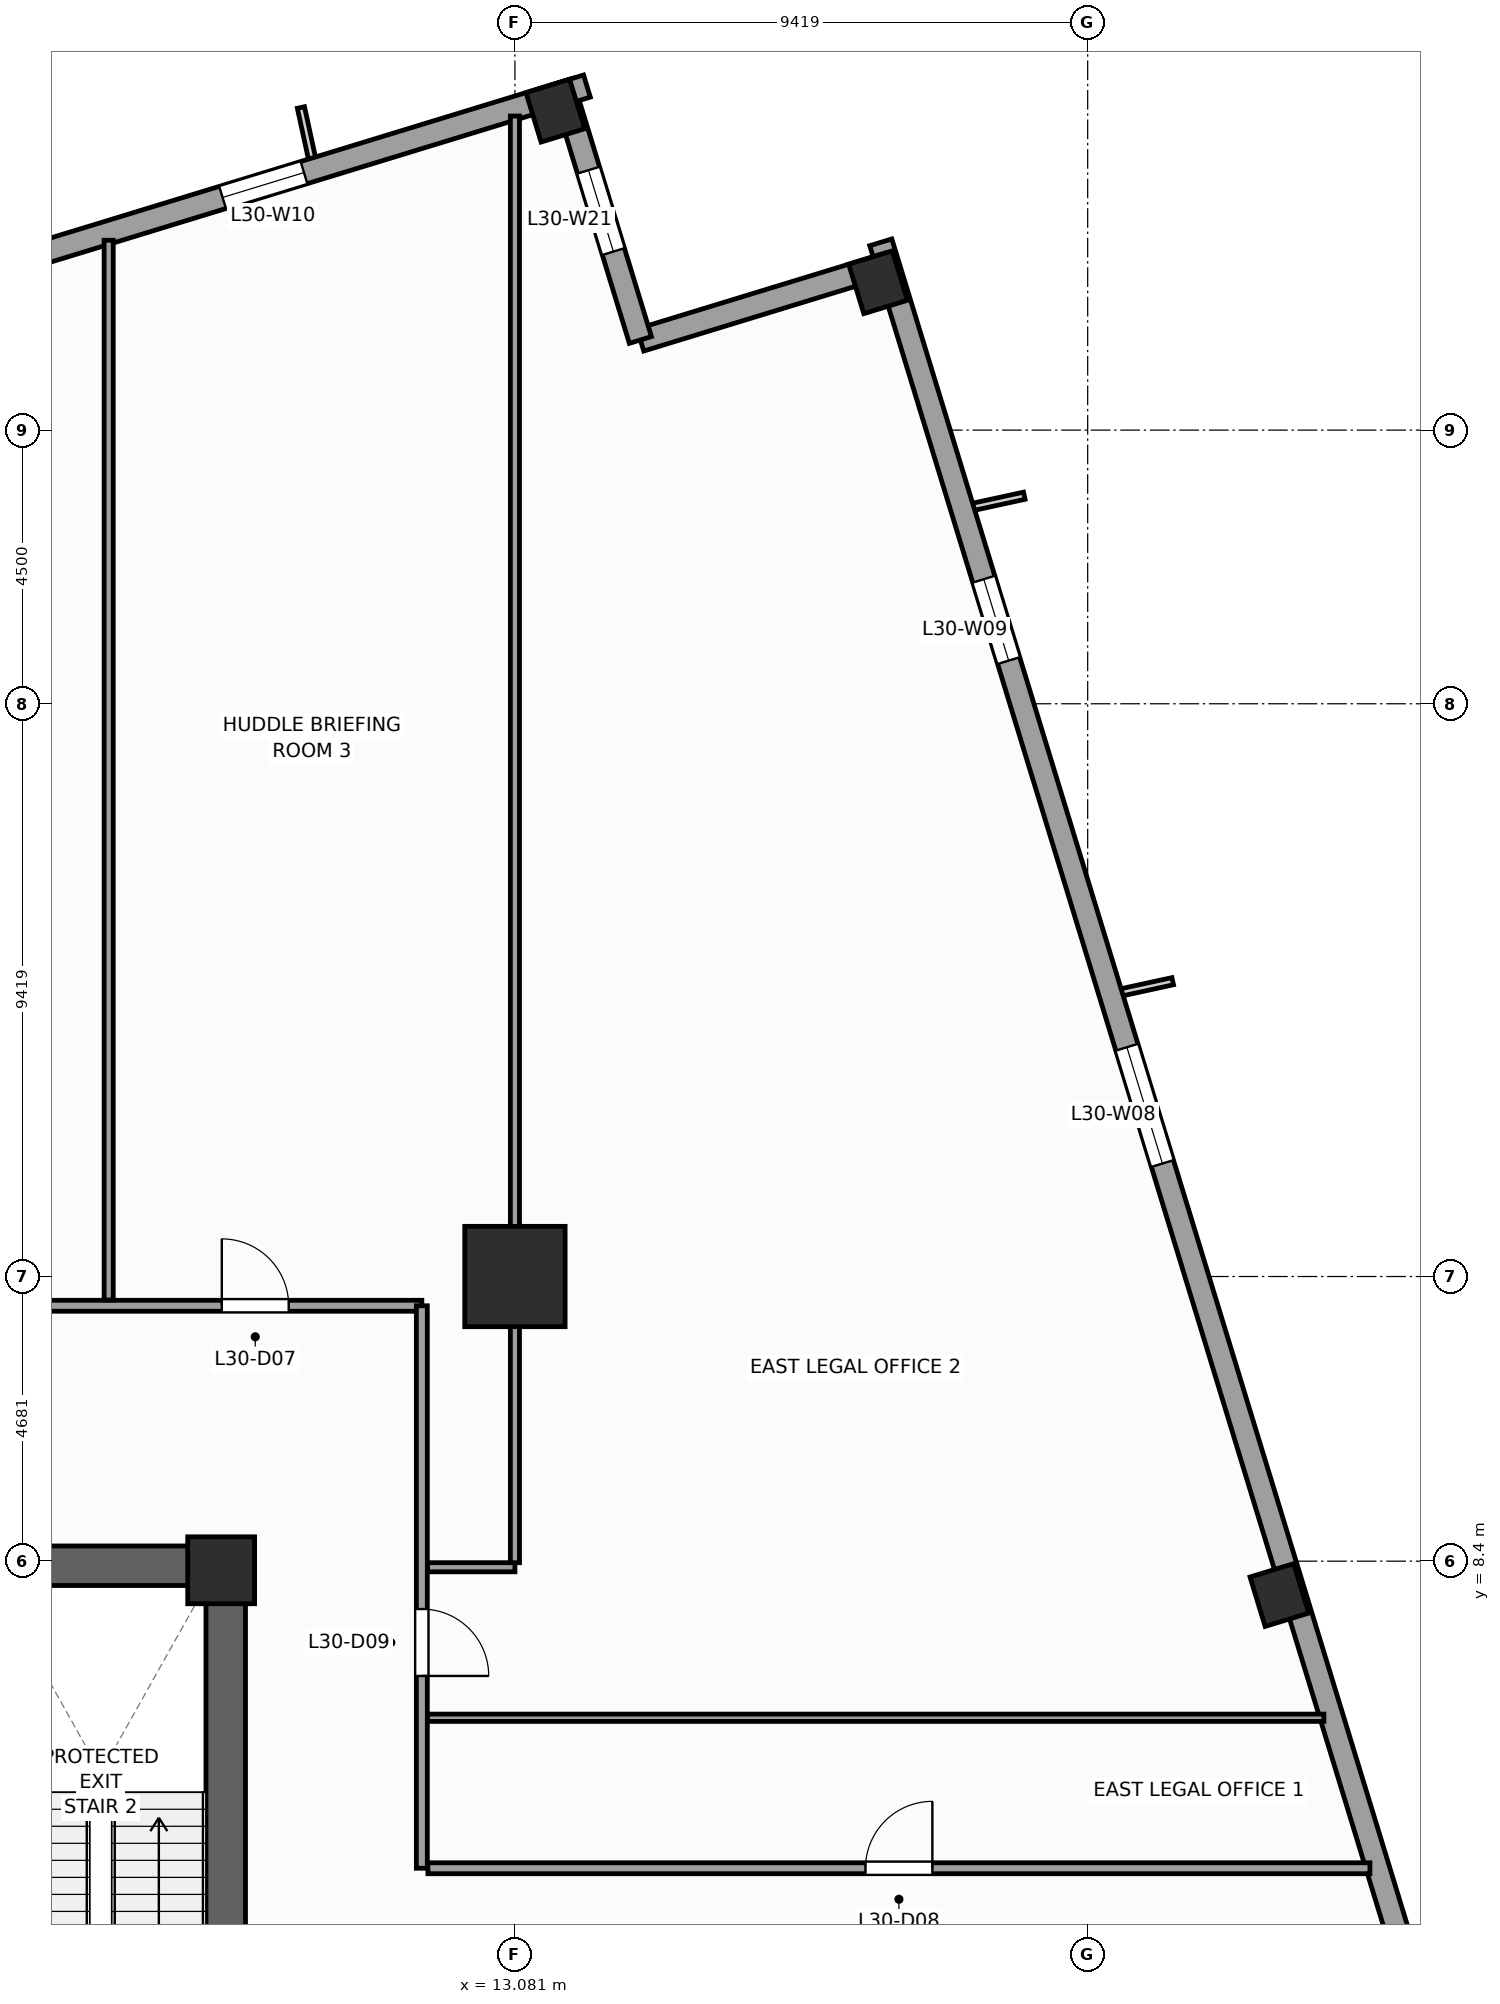
"""IFC4 building model, lengths in metres.
Left out: names, types, materials, properties, quantities, classifications, styles, units other than length and angle.
Written with IfcOpenShell. Run it as: python <this file> out.ifc"""

import sys

from ifc_helpers import new_model, si_unit, direction, frame, frame_2d, origin, origin_2d, place, context, subcontext, project, spatial, rectangle, extrude, source, transform, mapped, element, fill, save


model = new_model("IFC4")
c1 = context("Model", 3, precision=1e-05, world=origin(), true_north=direction((0.0, 1.0)))
c2 = subcontext(c1, "Body", "Model", "MODEL_VIEW")
j1 = project(units=[si_unit("LENGTHUNIT", "METRE"), si_unit("PLANEANGLEUNIT", "RADIAN")], contexts=[c1])
p1 = place(None, origin())
s1 = spatial("IfcSite", under=j1, at=p1, CompositionType="ELEMENT")
p2 = place(p1, origin())
s2 = spatial("IfcBuilding", under=s1, at=p2, CompositionType="ELEMENT")
p3 = place(p2, frame((0.0, 0.0, 127.2)))
s3 = spatial("IfcBuildingStorey", under=s2, at=p3, CompositionType="ELEMENT", Elevation=127.2)
p4 = place(p3, frame((-8.65, 8.325, 0.0), z_axis=(0.0, 0.0, 1.0), x_axis=(1.0, 0.0, 0.0)))
e1 = element("IfcWall", 1, at=p4, inside=s3, PredefinedType="SHEAR", context=c2, shape_type="SweptSolid", body=[
    extrude(rectangle(XDim=17.3, YDim=0.65, at=frame_2d((8.65, 0.0))), origin(), (0.0, 0.0, 1.0), 4.0),
])
p5 = place(p3, frame((8.325, -8.0, 0.0), z_axis=(0.0, 0.0, 1.0), x_axis=(0.0, 1.0, 0.0)))
e2 = element("IfcWall", 2, at=p5, inside=s3, PredefinedType="SHEAR", context=c2, shape_type="SweptSolid", body=[
    extrude(rectangle(XDim=16.0, YDim=0.65, at=frame_2d((8.0, 0.0))), origin(), (0.0, 0.0, 1.0), 4.0),
])
p6 = place(p5, frame((4.69, 0.0, 0.0)))
e3 = element("IfcOpeningElement", 3, at=p6, cuts=e2, PredefinedType="OPENING", context=c2, shape_type="SweptSolid", body=[
    extrude(rectangle(XDim=1.3, YDim=2.2, at=frame_2d((0.65, 1.1))), frame((0.0, 0.335, 0.0), z_axis=(0.0, -1.0, 0.0), x_axis=(1.0, 0.0, 0.0)), (0.0, 0.0, 1.0), 0.67),
])
m1 = source(origin(), c2, "Body", "SweptSolid", [
    extrude(rectangle(XDim=1.1, YDim=1.1, at=origin_2d()), origin(), (0.0, 0.0, 1.0), 4.0),
])
p7 = place(p3, frame((8.25, 8.25, 0.0), z_axis=(0.0, 0.0, 1.0), x_axis=(1.0, 0.0, 0.0)))
e4 = element("IfcColumn", 4, at=p7, inside=s3, PredefinedType="PILASTER", context=c2, shape_type="MappedRepresentation", body=[
    mapped(m1, transform((0.0, 0.0, 0.0), scale=1.0)),
])
m2 = source(origin(), c2, "Body", "SweptSolid", [
    extrude(rectangle(XDim=1.65, YDim=1.65, at=origin_2d()), origin(), (0.0, 0.0, 1.0), 4.0),
])
p8 = place(p3, frame((13.081, 13.081, 0.0), z_axis=(0.0, 0.0, 1.0), x_axis=(1.0, 0.0, 0.0)))
e5 = element("IfcColumn", 5, at=p8, inside=s3, PredefinedType="COLUMN", context=c2, shape_type="MappedRepresentation", body=[
    mapped(m2, transform((0.0, 0.0, 0.0), scale=1.0)),
])
m3 = source(origin(), c2, "Body", "SweptSolid", [
    extrude(rectangle(XDim=0.75, YDim=0.85, at=origin_2d()), origin(), (0.0, 0.0, 1.0), 4.0),
])
for number, where, z_axis, x_axis in (
    (6, (25.653, 7.843, 0.0), (0.0, 0.0, 1.0), (0.956, 0.292, 0.0)),
    (7, (19.052, 29.431, 0.0), (0.0, 0.0, 1.0), (0.956, 0.292, 0.0)),
    (8, (13.746, 32.253, 0.0), (0.0, 0.0, 1.0), (0.956, 0.292, 0.0)),
):
    element("IfcColumn", number, at=place(p3, frame(where, z_axis=z_axis, x_axis=x_axis)), inside=s3, PredefinedType="COLUMN", context=c2, shape_type="MappedRepresentation", body=[
        mapped(m3, transform((0.0, 0.0, 0.0), scale=1.0)),
    ])
p9 = place(p3, frame((32.658, -14.265, 0.0), z_axis=(0.0, 0.0, 1.0), x_axis=(-0.292373127906, 0.956304320851, 0.0)))
e9 = element("IfcWall", 9, at=p9, inside=s3, PredefinedType="STANDARD", context=c2, shape_type="SweptSolid", body=[
    extrude(rectangle(XDim=46.38, YDim=0.38, at=frame_2d((23.19, 0.0))), origin(), (0.0, 0.0, 1.0), 3.14),
])
p10 = place(p9, frame((4.865, 0.0, 0.51)))
e10 = element("IfcOpeningElement", 10, at=p10, cuts=e9, PredefinedType="OPENING", context=c2, shape_type="SweptSolid", body=[
    extrude(rectangle(XDim=1.4, YDim=2.4, at=frame_2d((0.7, 1.2))), frame((0.0, 0.2, 0.0), z_axis=(0.0, -1.0, 0.0), x_axis=(1.0, 0.0, 0.0)), (0.0, 0.0, 1.0), 0.4),
])
p11 = place(p9, frame((12.45, 0.0, 0.51)))
e11 = element("IfcOpeningElement", 11, at=p11, cuts=e9, PredefinedType="OPENING", context=c2, shape_type="SweptSolid", body=[
    extrude(rectangle(XDim=2.0, YDim=2.4, at=frame_2d((1.0, 1.2))), frame((0.0, 0.2, 0.0), z_axis=(0.0, -1.0, 0.0), x_axis=(1.0, 0.0, 0.0)), (0.0, 0.0, 1.0), 0.4),
])
p12 = place(p9, frame((30.538, 0.0, 0.51)))
e12 = element("IfcOpeningElement", 12, at=p12, cuts=e9, PredefinedType="OPENING", context=c2, shape_type="SweptSolid", body=[
    extrude(rectangle(XDim=2.0, YDim=2.4, at=frame_2d((1.0, 1.2))), frame((0.0, 0.2, 0.0), z_axis=(0.0, -1.0, 0.0), x_axis=(1.0, 0.0, 0.0)), (0.0, 0.0, 1.0), 0.4),
])
p13 = place(p9, frame((39.187, 0.0, 0.51)))
e13 = element("IfcOpeningElement", 13, at=p13, cuts=e9, PredefinedType="OPENING", context=c2, shape_type="SweptSolid", body=[
    extrude(rectangle(XDim=1.4, YDim=2.4, at=frame_2d((0.7, 1.2))), frame((0.0, 0.2, 0.0), z_axis=(0.0, -1.0, 0.0), x_axis=(1.0, 0.0, 0.0)), (0.0, 0.0, 1.0), 0.4),
])
p14 = place(p3, frame((19.208, 29.725, 0.0), z_axis=(0.0, 0.0, 1.0), x_axis=(-0.956312764915, -0.292345507338, 0.0)))
e14 = element("IfcWall", 14, at=p14, inside=s3, PredefinedType="STANDARD", context=c2, shape_type="SweptSolid", body=[
    extrude(rectangle(XDim=4.25, YDim=0.38, at=frame_2d((2.125, 0.0))), origin(), (0.0, 0.0, 1.0), 3.74),
])
p15 = place(p3, frame((15.144, 28.482, 0.0), z_axis=(0.0, 0.0, 1.0), x_axis=(-0.292373601522, 0.956304176051, 0.0)))
e15 = element("IfcWall", 15, at=p15, inside=s3, PredefinedType="STANDARD", context=c2, shape_type="SweptSolid", body=[
    extrude(rectangle(XDim=4.44, YDim=0.38, at=frame_2d((2.22, 0.0))), origin(), (0.0, 0.0, 1.0), 3.04),
])
p16 = place(p15, frame((1.52, 0.0, 0.51)))
e16 = element("IfcOpeningElement", 16, at=p16, cuts=e15, PredefinedType="OPENING", context=c2, shape_type="SweptSolid", body=[
    extrude(rectangle(XDim=1.4, YDim=2.4, at=frame_2d((0.7, 1.2))), frame((0.0, 0.2, 0.0), z_axis=(0.0, -1.0, 0.0), x_axis=(1.0, 0.0, 0.0)), (0.0, 0.0, 1.0), 0.4),
])
p17 = place(p3, frame((14.265, 32.658, 0.0), z_axis=(0.0, 0.0, 1.0), x_axis=(-0.956304320851, -0.292373127906, 0.0)))
e17 = element("IfcWall", 17, at=p17, inside=s3, PredefinedType="STANDARD", context=c2, shape_type="SweptSolid", body=[
    extrude(rectangle(XDim=46.38, YDim=0.38, at=frame_2d((23.19, 0.0))), origin(), (0.0, 0.0, 1.0), 3.14),
])
p18 = place(p17, frame((17.065, 0.0, 0.0)))
e18 = element("IfcOpeningElement", 18, at=p18, cuts=e17, PredefinedType="OPENING", context=c2, shape_type="SweptSolid", body=[
    extrude(rectangle(XDim=1.05, YDim=2.25, at=frame_2d((0.525, 1.125))), frame((0.0, 0.2, 0.0), z_axis=(0.0, -1.0, 0.0), x_axis=(1.0, 0.0, 0.0)), (0.0, 0.0, 1.0), 0.4),
])
p19 = place(p17, frame((4.865, 0.0, 0.51)))
e19 = element("IfcOpeningElement", 19, at=p19, cuts=e17, PredefinedType="OPENING", context=c2, shape_type="SweptSolid", body=[
    extrude(rectangle(XDim=1.4, YDim=2.4, at=frame_2d((0.7, 1.2))), frame((0.0, 0.2, 0.0), z_axis=(0.0, -1.0, 0.0), x_axis=(1.0, 0.0, 0.0)), (0.0, 0.0, 1.0), 0.4),
])
p20 = place(p17, frame((12.45, 0.0, 0.51)))
e20 = element("IfcOpeningElement", 20, at=p20, cuts=e17, PredefinedType="OPENING", context=c2, shape_type="SweptSolid", body=[
    extrude(rectangle(XDim=2.0, YDim=2.4, at=frame_2d((1.0, 1.2))), frame((0.0, 0.2, 0.0), z_axis=(0.0, -1.0, 0.0), x_axis=(1.0, 0.0, 0.0)), (0.0, 0.0, 1.0), 0.4),
])
p21 = place(p17, frame((20.512, 0.0, 0.51)))
e21 = element("IfcOpeningElement", 21, at=p21, cuts=e17, PredefinedType="OPENING", context=c2, shape_type="SweptSolid", body=[
    extrude(rectangle(XDim=2.0, YDim=2.4, at=frame_2d((1.0, 1.2))), frame((0.0, 0.2, 0.0), z_axis=(0.0, -1.0, 0.0), x_axis=(1.0, 0.0, 0.0)), (0.0, 0.0, 1.0), 0.4),
])
p22 = place(p17, frame((30.538, 0.0, 0.51)))
e22 = element("IfcOpeningElement", 22, at=p22, cuts=e17, PredefinedType="OPENING", context=c2, shape_type="SweptSolid", body=[
    extrude(rectangle(XDim=2.0, YDim=2.4, at=frame_2d((1.0, 1.2))), frame((0.0, 0.2, 0.0), z_axis=(0.0, -1.0, 0.0), x_axis=(1.0, 0.0, 0.0)), (0.0, 0.0, 1.0), 0.4),
])
p23 = place(p17, frame((39.187, 0.0, 0.51)))
e23 = element("IfcOpeningElement", 23, at=p23, cuts=e17, PredefinedType="OPENING", context=c2, shape_type="SweptSolid", body=[
    extrude(rectangle(XDim=1.4, YDim=2.4, at=frame_2d((0.7, 1.2))), frame((0.0, 0.2, 0.0), z_axis=(0.0, -1.0, 0.0), x_axis=(1.0, 0.0, 0.0)), (0.0, 0.0, 1.0), 0.4),
])
p24 = place(p3, frame((-10.45, 12.6, 0.0), z_axis=(0.0, 0.0, 1.0), x_axis=(1.0, 0.0, 0.0)))
e24 = element("IfcWall", 24, at=p24, inside=s3, PredefinedType="PARTITIONING", context=c2, shape_type="SweptSolid", body=[
    extrude(rectangle(XDim=22.0, YDim=0.18, at=frame_2d((11.0, 0.0))), origin(), (0.0, 0.0, 1.0), 3.74),
])
p25 = place(p24, frame((4.839, 0.0, 0.0)))
e25 = element("IfcOpeningElement", 25, at=p25, cuts=e24, PredefinedType="OPENING", context=c2, shape_type="SweptSolid", body=[
    extrude(rectangle(XDim=1.1, YDim=2.2, at=frame_2d((0.55, 1.1))), frame((0.0, 0.1, 0.0), z_axis=(0.0, -1.0, 0.0), x_axis=(1.0, 0.0, 0.0)), (0.0, 0.0, 1.0), 0.2),
])
p26 = place(p24, frame((13.1, 0.0, 0.0)))
e26 = element("IfcOpeningElement", 26, at=p26, cuts=e24, PredefinedType="OPENING", context=c2, shape_type="SweptSolid", body=[
    extrude(rectangle(XDim=1.1, YDim=2.2, at=frame_2d((0.55, 1.1))), frame((0.0, 0.1, 0.0), z_axis=(0.0, -1.0, 0.0), x_axis=(1.0, 0.0, 0.0)), (0.0, 0.0, 1.0), 0.2),
])
p27 = place(p24, frame((18.71, 0.0, 0.0)))
e27 = element("IfcOpeningElement", 27, at=p27, cuts=e24, PredefinedType="OPENING", context=c2, shape_type="SweptSolid", body=[
    extrude(rectangle(XDim=1.1, YDim=2.2, at=frame_2d((0.55, 1.1))), frame((0.0, 0.1, 0.0), z_axis=(0.0, -1.0, 0.0), x_axis=(1.0, 0.0, 0.0)), (0.0, 0.0, 1.0), 0.2),
])
p28 = place(p3, frame((11.55, 3.35, 0.0), z_axis=(0.0, 0.0, 1.0), x_axis=(0.0, 1.0, 0.0)))
e28 = element("IfcWall", 28, at=p28, inside=s3, PredefinedType="PARTITIONING", context=c2, shape_type="SweptSolid", body=[
    extrude(rectangle(XDim=9.25, YDim=0.18, at=frame_2d((4.625, 0.0))), origin(), (0.0, 0.0, 1.0), 3.74),
])
p29 = place(p28, frame((3.163, 0.0, 0.0)))
e29 = element("IfcOpeningElement", 29, at=p29, cuts=e28, PredefinedType="OPENING", context=c2, shape_type="SweptSolid", body=[
    extrude(rectangle(XDim=1.1, YDim=2.2, at=frame_2d((0.55, 1.1))), frame((0.0, 0.1, 0.0), z_axis=(0.0, -1.0, 0.0), x_axis=(1.0, 0.0, 0.0)), (0.0, 0.0, 1.0), 0.2),
])
p30 = place(p3, frame((11.65, 3.35, 0.0), z_axis=(0.0, 0.0, 1.0), x_axis=(1.0, 0.0, 0.0)))
e30 = element("IfcWall", 30, at=p30, inside=s3, PredefinedType="PARTITIONING", context=c2, shape_type="SweptSolid", body=[
    extrude(rectangle(XDim=15.492, YDim=0.18, at=frame_2d((7.746, 0.0))), origin(), (0.0, 0.0, 1.0), 3.74),
])
p31 = place(p30, frame((7.196, 0.0, 0.0)))
e31 = element("IfcOpeningElement", 31, at=p31, cuts=e30, PredefinedType="OPENING", context=c2, shape_type="SweptSolid", body=[
    extrude(rectangle(XDim=1.1, YDim=2.2, at=frame_2d((0.55, 1.1))), frame((0.0, 0.1, 0.0), z_axis=(0.0, -1.0, 0.0), x_axis=(1.0, 0.0, 0.0)), (0.0, 0.0, 1.0), 0.2),
])
p32 = place(p3, frame((6.4, 12.695, 0.0), z_axis=(0.0, 0.0, 1.0), x_axis=(0.0, 1.0, 0.0)))
e32 = element("IfcWall", 32, at=p32, inside=s3, PredefinedType="PARTITIONING", context=c2, shape_type="SweptSolid", body=[
    extrude(rectangle(XDim=17.427, YDim=0.15, at=frame_2d((8.714, 0.0))), origin(), (0.0, 0.0, 1.0), 3.74),
])
p33 = place(p3, frame((11.645, 8.3, 0.0), z_axis=(0.0, 0.0, 1.0), x_axis=(1.0, 0.0, 0.0)))
e33 = element("IfcWall", 33, at=p33, inside=s3, PredefinedType="PARTITIONING", context=c2, shape_type="SweptSolid", body=[
    extrude(rectangle(XDim=1.436, YDim=0.15, at=frame_2d((0.718, 0.0))), origin(), (0.0, 0.0, 1.0), 3.74),
])
p34 = place(p3, frame((13.081, 8.375, 0.0), z_axis=(0.0, 0.0, 1.0), x_axis=(0.0, 1.0, 0.0)))
e34 = element("IfcWall", 34, at=p34, inside=s3, PredefinedType="PARTITIONING", context=c2, shape_type="SweptSolid", body=[
    extrude(rectangle(XDim=23.79, YDim=0.15, at=frame_2d((11.895, 0.0))), origin(), (0.0, 0.0, 1.0), 2.732),
])
p35 = place(p3, frame((11.645, 5.825, 0.0), z_axis=(0.0, 0.0, 1.0), x_axis=(1.0, 0.0, 0.0)))
e35 = element("IfcWall", 35, at=p35, inside=s3, PredefinedType="PARTITIONING", context=c2, shape_type="SweptSolid", body=[
    extrude(rectangle(XDim=14.74, YDim=0.12, at=frame_2d((7.37, 0.0))), origin(), (0.0, 0.0, 1.0), 3.74),
])
m4 = source(origin(), c2, "Body", "SweptSolid", [
    extrude(rectangle(XDim=2.0, YDim=2.4, at=frame_2d((1.0, 1.2))), frame((0.0, 0.03, 0.0), z_axis=(0.0, -1.0, 0.0), x_axis=(1.0, 0.0, 0.0)), (0.0, 0.0, 1.0), 0.06),
])
p36 = place(p12, origin())
e36 = element("IfcWindow", 36, at=p36, inside=s3, PartitioningType="SINGLE_PANEL", PredefinedType="WINDOW", context=c2, shape_type="MappedRepresentation", body=[
    mapped(m4, transform((0.0, 0.0, 0.0), scale=1.0)),
])
fill(e12, e36)
m5 = source(origin(), c2, "Body", "SweptSolid", [
    extrude(rectangle(XDim=1.4, YDim=2.4, at=frame_2d((0.7, 1.2))), frame((0.0, 0.03, 0.0), z_axis=(0.0, -1.0, 0.0), x_axis=(1.0, 0.0, 0.0)), (0.0, 0.0, 1.0), 0.06),
])
p37 = place(p13, origin())
e37 = element("IfcWindow", 37, at=p37, inside=s3, PartitioningType="SINGLE_PANEL", PredefinedType="WINDOW", context=c2, shape_type="MappedRepresentation", body=[
    mapped(m5, transform((0.0, 0.0, 0.0), scale=1.0)),
])
fill(e13, e37)
p38 = place(p19, origin())
e38 = element("IfcWindow", 38, at=p38, inside=s3, PartitioningType="SINGLE_PANEL", PredefinedType="WINDOW", context=c2, shape_type="MappedRepresentation", body=[
    mapped(m5, transform((0.0, 0.0, 0.0), scale=1.0)),
])
fill(e19, e38)
p39 = place(p16, origin())
e39 = element("IfcWindow", 39, at=p39, inside=s3, PartitioningType="SINGLE_PANEL", PredefinedType="WINDOW", context=c2, shape_type="MappedRepresentation", body=[
    mapped(m5, transform((0.0, 0.0, 0.0), scale=1.0)),
])
fill(e16, e39)
m6 = source(origin(), c2, "Body", "SweptSolid", [
    extrude(rectangle(XDim=1.1, YDim=2.2, at=frame_2d((0.55, 1.1))), frame((0.0, 0.025, 0.0), z_axis=(0.0, -1.0, 0.0), x_axis=(1.0, 0.0, 0.0)), (0.0, 0.0, 1.0), 0.05),
])
p40 = place(p27, origin())
e40 = element("IfcDoor", 40, at=p40, inside=s3, OperationType="SINGLE_SWING_LEFT", PredefinedType="DOOR", context=c2, shape_type="MappedRepresentation", body=[
    mapped(m6, transform((0.0, 0.0, 0.0), scale=1.0)),
])
fill(e27, e40)
p41 = place(p31, origin())
e41 = element("IfcDoor", 41, at=p41, inside=s3, OperationType="SINGLE_SWING_RIGHT", PredefinedType="DOOR", context=c2, shape_type="MappedRepresentation", body=[
    mapped(m6, transform((0.0, 0.0, 0.0), scale=1.0)),
])
fill(e31, e41)
p42 = place(p29, frame((1.1, 0.0, 0.0), z_axis=(0.0, 0.0, 1.0), x_axis=(-1.0, 0.0, 0.0)))
e42 = element("IfcDoor", 42, at=p42, inside=s3, OperationType="SINGLE_SWING_LEFT", PredefinedType="DOOR", context=c2, shape_type="MappedRepresentation", body=[
    mapped(m6, transform((0.0, 0.0, 0.0), scale=1.0)),
])
fill(e29, e42)
save(model, sys.argv[1])
